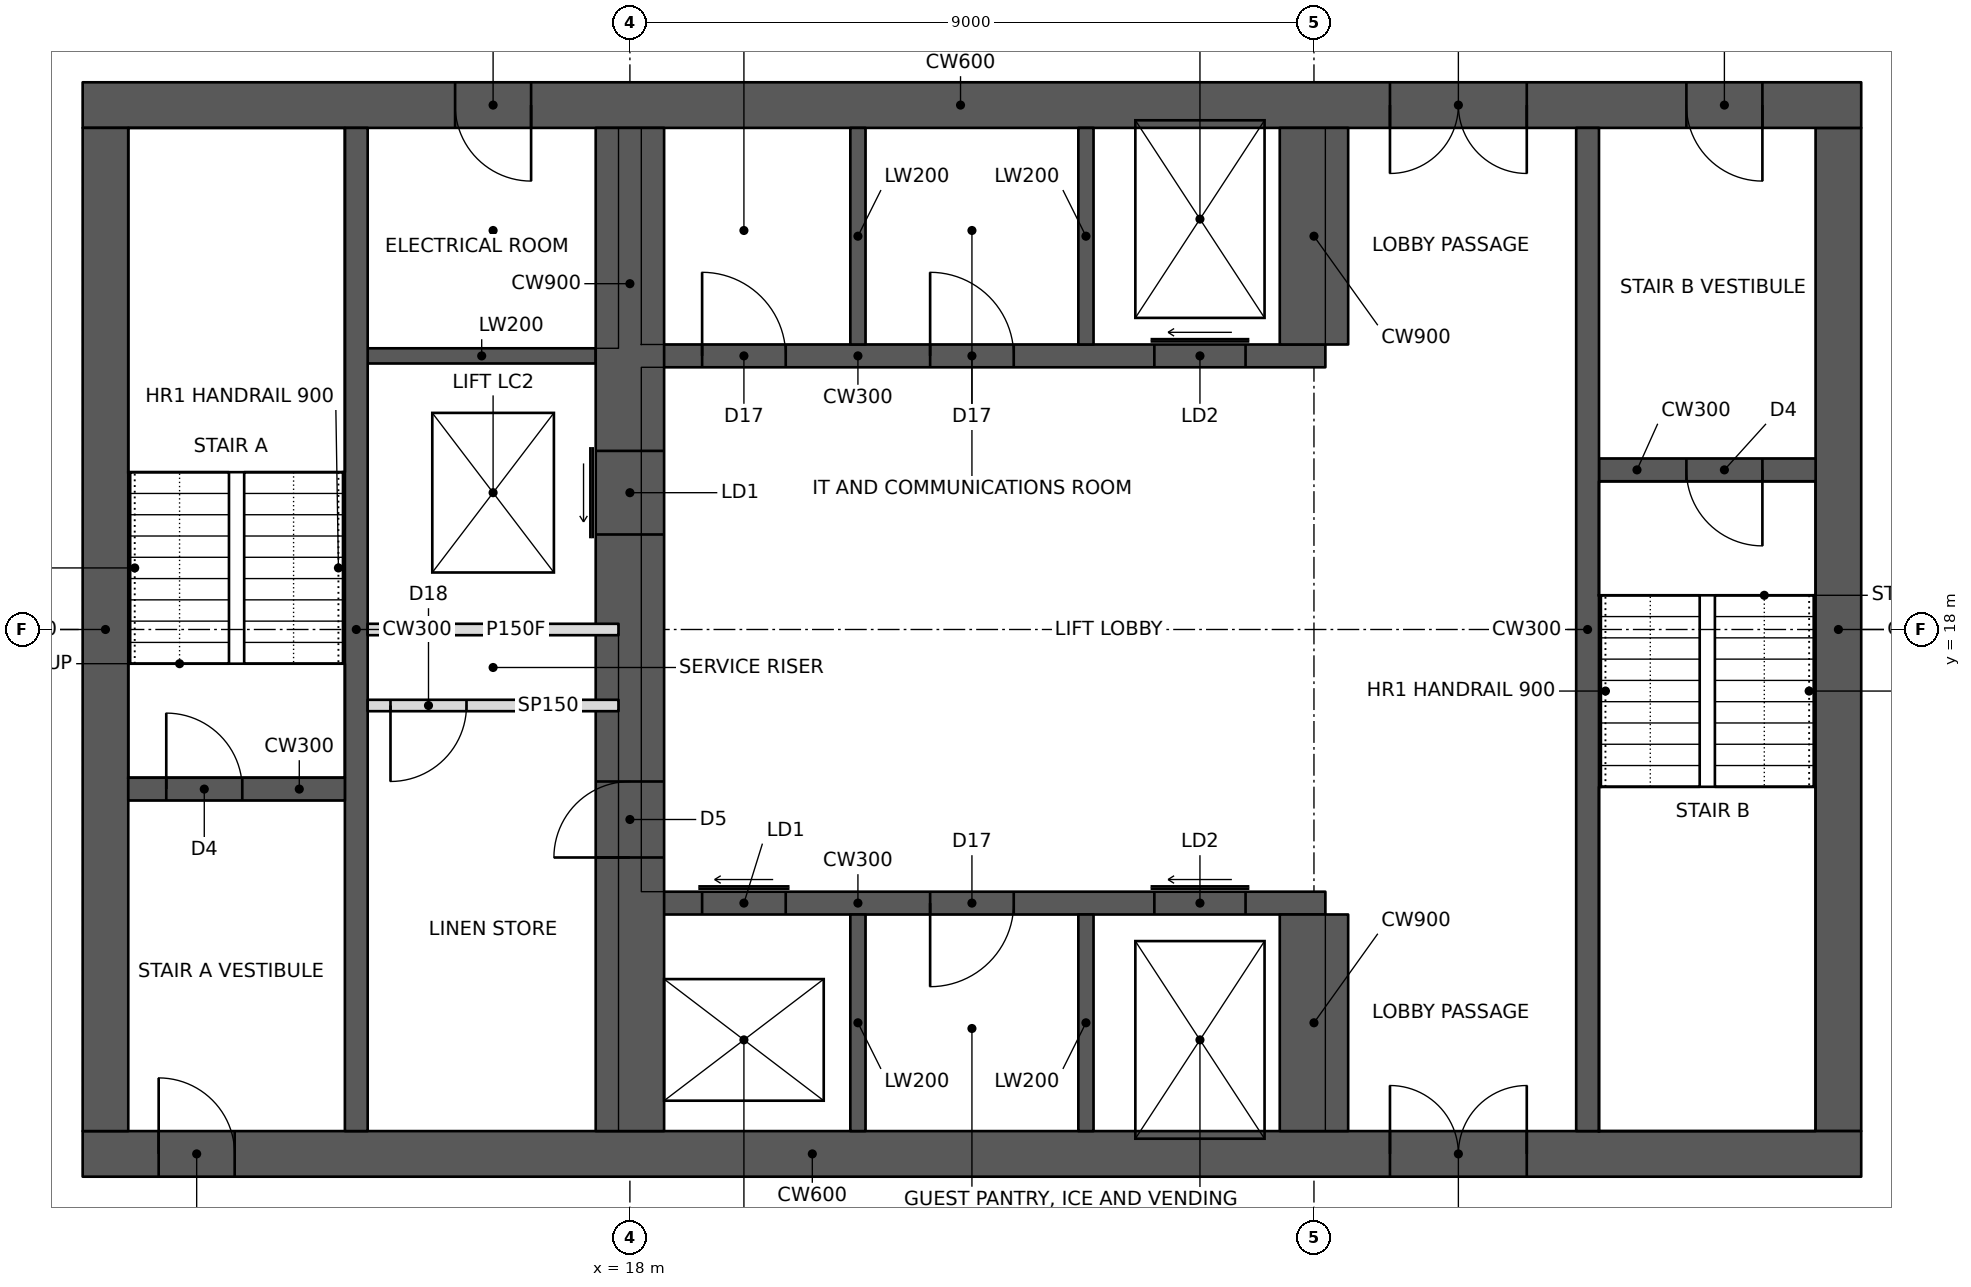
"""IFC4 building model, lengths in metres.
Left out: names, types, materials, properties, quantities, classifications, styles, units other than length and angle.
Written with IfcOpenShell. Run it as: python <this file> out.ifc"""

import sys

from ifc_helpers import new_model, si_unit, direction, frame, frame_2d, origin, place, context, subcontext, project, spatial, rectangle, extrude, element, fill, save


model = new_model("IFC4")
c1 = context("Model", 3, precision=1e-05, world=origin(), true_north=direction((0.0, 1.0)))
c2 = subcontext(c1, "Body", "Model", "MODEL_VIEW")
j1 = project(units=[si_unit("LENGTHUNIT", "METRE"), si_unit("PLANEANGLEUNIT", "RADIAN")], contexts=[c1])
p1 = place(None, origin())
s1 = spatial("IfcSite", under=j1, at=p1, CompositionType="ELEMENT")
p2 = place(p1, origin())
s2 = spatial("IfcBuilding", under=s1, at=p2, CompositionType="ELEMENT")
p3 = place(p2, frame((0.0, 0.0, 218.2)))
s3 = spatial("IfcBuildingStorey", under=s2, at=p3, CompositionType="ELEMENT", Elevation=218.2)
p4 = place(p3, frame((10.8, 11.1, 0.0), z_axis=(0.0, 0.0, 1.0), x_axis=(1.0, 0.0, 0.0)))
e1 = element("IfcWall", 1, at=p4, inside=s3, PredefinedType="SHEAR", context=c2, shape_type="SweptSolid", body=[
    extrude(rectangle(XDim=23.4, YDim=0.6, at=frame_2d((11.7, 0.0))), origin(), (0.0, 0.0, 1.0), 3.4),
])
p5 = place(p4, frame((1.0, 0.0, 0.0)))
e2 = element("IfcOpeningElement", 2, at=p5, cuts=e1, PredefinedType="OPENING", context=c2, shape_type="SweptSolid", body=[
    extrude(rectangle(XDim=1.0, YDim=2.1, at=frame_2d((0.5, 1.05))), frame((0.0, 0.31, 0.0), z_axis=(0.0, -1.0, 0.0), x_axis=(1.0, 0.0, 0.0)), (0.0, 0.0, 1.0), 0.62),
])
p6 = place(p4, frame((17.2, 0.0, 0.0)))
e3 = element("IfcOpeningElement", 3, at=p6, cuts=e1, PredefinedType="OPENING", context=c2, shape_type="SweptSolid", body=[
    extrude(rectangle(XDim=1.8, YDim=2.1, at=frame_2d((0.9, 1.05))), frame((0.0, 0.31, 0.0), z_axis=(0.0, -1.0, 0.0), x_axis=(1.0, 0.0, 0.0)), (0.0, 0.0, 1.0), 0.62),
])
p7 = place(p3, frame((10.8, 24.9, 0.0), z_axis=(0.0, 0.0, 1.0), x_axis=(1.0, 0.0, 0.0)))
e4 = element("IfcWall", 4, at=p7, inside=s3, PredefinedType="SHEAR", context=c2, shape_type="SweptSolid", body=[
    extrude(rectangle(XDim=23.4, YDim=0.6, at=frame_2d((11.7, 0.0))), origin(), (0.0, 0.0, 1.0), 3.4),
])
p8 = place(p7, frame((17.2, 0.0, 0.0)))
e5 = element("IfcOpeningElement", 5, at=p8, cuts=e4, PredefinedType="OPENING", context=c2, shape_type="SweptSolid", body=[
    extrude(rectangle(XDim=1.8, YDim=2.1, at=frame_2d((0.9, 1.05))), frame((0.0, 0.31, 0.0), z_axis=(0.0, -1.0, 0.0), x_axis=(1.0, 0.0, 0.0)), (0.0, 0.0, 1.0), 0.62),
])
p9 = place(p7, frame((21.1, 0.0, 0.0)))
e6 = element("IfcOpeningElement", 6, at=p9, cuts=e4, PredefinedType="OPENING", context=c2, shape_type="SweptSolid", body=[
    extrude(rectangle(XDim=1.0, YDim=2.1, at=frame_2d((0.5, 1.05))), frame((0.0, 0.31, 0.0), z_axis=(0.0, -1.0, 0.0), x_axis=(1.0, 0.0, 0.0)), (0.0, 0.0, 1.0), 0.62),
])
p10 = place(p7, frame((4.9, 0.0, 0.0)))
e7 = element("IfcOpeningElement", 7, at=p10, cuts=e4, PredefinedType="OPENING", context=c2, shape_type="SweptSolid", body=[
    extrude(rectangle(XDim=1.0, YDim=2.1, at=frame_2d((0.5, 1.05))), frame((0.0, 0.31, 0.0), z_axis=(0.0, -1.0, 0.0), x_axis=(1.0, 0.0, 0.0)), (0.0, 0.0, 1.0), 0.62),
])
for number, where, z_axis, x_axis in (
    (8, (11.1, 11.4, 0.0), (0.0, 0.0, 1.0), (0.0, 1.0, 0.0)),
    (9, (33.9, 11.4, 0.0), (0.0, 0.0, 1.0), (0.0, 1.0, 0.0)),
):
    element("IfcWall", number, at=place(p3, frame(where, z_axis=z_axis, x_axis=x_axis)), inside=s3, PredefinedType="SHEAR", context=c2, shape_type="SweptSolid", body=[
        extrude(rectangle(XDim=13.2, YDim=0.6, at=frame_2d((6.6, 0.0))), origin(), (0.0, 0.0, 1.0), 3.4),
    ])
p11 = place(p3, frame((14.4, 11.4, 0.0), z_axis=(0.0, 0.0, 1.0), x_axis=(0.0, 1.0, 0.0)))
e10 = element("IfcWall", 10, at=p11, inside=s3, PredefinedType="SHEAR", context=c2, shape_type="SweptSolid", body=[
    extrude(rectangle(XDim=13.2, YDim=0.3, at=frame_2d((6.6, 0.0))), origin(), (0.0, 0.0, 1.0), 3.4),
])
p12 = place(p3, frame((11.4, 15.9, 0.0), z_axis=(0.0, 0.0, 1.0), x_axis=(1.0, 0.0, 0.0)))
e11 = element("IfcWall", 11, at=p12, inside=s3, PredefinedType="SHEAR", context=c2, shape_type="SweptSolid", body=[
    extrude(rectangle(XDim=2.85, YDim=0.3, at=frame_2d((1.425, 0.0))), origin(), (0.0, 0.0, 1.0), 3.4),
])
p13 = place(p12, frame((0.5, 0.0, 0.0)))
e12 = element("IfcOpeningElement", 12, at=p13, cuts=e11, PredefinedType="OPENING", context=c2, shape_type="SweptSolid", body=[
    extrude(rectangle(XDim=1.0, YDim=2.1, at=frame_2d((0.5, 1.05))), frame((0.0, 0.16, 0.0), z_axis=(0.0, -1.0, 0.0), x_axis=(1.0, 0.0, 0.0)), (0.0, 0.0, 1.0), 0.32),
])
p14 = place(p3, frame((18.0, 11.4, 0.0), z_axis=(0.0, 0.0, 1.0), x_axis=(0.0, 1.0, 0.0)))
e13 = element("IfcWall", 13, at=p14, inside=s3, PredefinedType="SHEAR", context=c2, shape_type="SweptSolid", body=[
    extrude(rectangle(XDim=13.2, YDim=0.9, at=frame_2d((6.6, 0.0))), origin(), (0.0, 0.0, 1.0), 3.4),
])
p15 = place(p14, frame((3.6, 0.0, 0.0)))
e14 = element("IfcOpeningElement", 14, at=p15, cuts=e13, PredefinedType="OPENING", context=c2, shape_type="SweptSolid", body=[
    extrude(rectangle(XDim=1.0, YDim=2.1, at=frame_2d((0.5, 1.05))), frame((0.0, 0.46, 0.0), z_axis=(0.0, -1.0, 0.0), x_axis=(1.0, 0.0, 0.0)), (0.0, 0.0, 1.0), 0.92),
])
p16 = place(p14, frame((7.85, 0.0, 0.0)))
e15 = element("IfcOpeningElement", 15, at=p16, cuts=e13, PredefinedType="OPENING", context=c2, shape_type="SweptSolid", body=[
    extrude(rectangle(XDim=1.1, YDim=2.1, at=frame_2d((0.55, 1.05))), frame((0.0, 0.46, 0.0), z_axis=(0.0, -1.0, 0.0), x_axis=(1.0, 0.0, 0.0)), (0.0, 0.0, 1.0), 0.92),
])
p17 = place(p3, frame((14.55, 18.0, 0.0), z_axis=(0.0, 0.0, 1.0), x_axis=(1.0, 0.0, 0.0)))
e16 = element("IfcWall", 16, at=p17, inside=s3, PredefinedType="PARTITIONING", context=c2, shape_type="SweptSolid", body=[
    extrude(rectangle(XDim=3.3, YDim=0.15, at=frame_2d((1.65, 0.0))), origin(), (0.0, 0.0, 1.0), 3.15),
])
p18 = place(p3, frame((18.15, 14.4, 0.0), z_axis=(0.0, 0.0, 1.0), x_axis=(1.0, 0.0, 0.0)))
e17 = element("IfcWall", 17, at=p18, inside=s3, PredefinedType="SHEAR", context=c2, shape_type="SweptSolid", body=[
    extrude(rectangle(XDim=9.0, YDim=0.3, at=frame_2d((4.5, 0.0))), origin(), (0.0, 0.0, 1.0), 3.4),
])
p19 = place(p18, frame((0.8, 0.0, 0.0)))
e18 = element("IfcOpeningElement", 18, at=p19, cuts=e17, PredefinedType="OPENING", context=c2, shape_type="SweptSolid", body=[
    extrude(rectangle(XDim=1.1, YDim=2.1, at=frame_2d((0.55, 1.05))), frame((0.0, 0.16, 0.0), z_axis=(0.0, -1.0, 0.0), x_axis=(1.0, 0.0, 0.0)), (0.0, 0.0, 1.0), 0.32),
])
p20 = place(p18, frame((6.75, 0.0, 0.0)))
e19 = element("IfcOpeningElement", 19, at=p20, cuts=e17, PredefinedType="OPENING", context=c2, shape_type="SweptSolid", body=[
    extrude(rectangle(XDim=1.2, YDim=2.1, at=frame_2d((0.6, 1.05))), frame((0.0, 0.16, 0.0), z_axis=(0.0, -1.0, 0.0), x_axis=(1.0, 0.0, 0.0)), (0.0, 0.0, 1.0), 0.32),
])
p21 = place(p18, frame((3.8, 0.0, 0.0)))
e20 = element("IfcOpeningElement", 20, at=p21, cuts=e17, PredefinedType="OPENING", context=c2, shape_type="SweptSolid", body=[
    extrude(rectangle(XDim=1.1, YDim=2.1, at=frame_2d((0.55, 1.05))), frame((0.0, 0.16, 0.0), z_axis=(0.0, -1.0, 0.0), x_axis=(1.0, 0.0, 0.0)), (0.0, 0.0, 1.0), 0.32),
])
p22 = place(p3, frame((27.0, 11.4, 0.0), z_axis=(0.0, 0.0, 1.0), x_axis=(0.0, 1.0, 0.0)))
e21 = element("IfcWall", 21, at=p22, inside=s3, PredefinedType="SHEAR", context=c2, shape_type="SweptSolid", body=[
    extrude(rectangle(XDim=2.85, YDim=0.9, at=frame_2d((1.425, 0.0))), origin(), (0.0, 0.0, 1.0), 3.4),
])
for number, where, z_axis, x_axis in (
    (22, (21.0, 11.4, 0.0), (0.0, 0.0, 1.0), (0.0, 1.0, 0.0)),
    (23, (24.0, 11.4, 0.0), (0.0, 0.0, 1.0), (0.0, 1.0, 0.0)),
):
    element("IfcWall", number, at=place(p3, frame(where, z_axis=z_axis, x_axis=x_axis)), inside=s3, PredefinedType="SHEAR", context=c2, shape_type="SweptSolid", body=[
        extrude(rectangle(XDim=2.85, YDim=0.2, at=frame_2d((1.425, 0.0))), origin(), (0.0, 0.0, 1.0), 3.4),
    ])
p23 = place(p3, frame((18.15, 21.6, 0.0), z_axis=(0.0, 0.0, 1.0), x_axis=(1.0, 0.0, 0.0)))
e24 = element("IfcWall", 24, at=p23, inside=s3, PredefinedType="SHEAR", context=c2, shape_type="SweptSolid", body=[
    extrude(rectangle(XDim=9.0, YDim=0.3, at=frame_2d((4.5, 0.0))), origin(), (0.0, 0.0, 1.0), 3.4),
])
p24 = place(p23, frame((6.75, 0.0, 0.0)))
e25 = element("IfcOpeningElement", 25, at=p24, cuts=e24, PredefinedType="OPENING", context=c2, shape_type="SweptSolid", body=[
    extrude(rectangle(XDim=1.2, YDim=2.1, at=frame_2d((0.6, 1.05))), frame((0.0, 0.16, 0.0), z_axis=(0.0, -1.0, 0.0), x_axis=(1.0, 0.0, 0.0)), (0.0, 0.0, 1.0), 0.32),
])
p25 = place(p23, frame((0.8, 0.0, 0.0)))
e26 = element("IfcOpeningElement", 26, at=p25, cuts=e24, PredefinedType="OPENING", context=c2, shape_type="SweptSolid", body=[
    extrude(rectangle(XDim=1.1, YDim=2.1, at=frame_2d((0.55, 1.05))), frame((0.0, 0.16, 0.0), z_axis=(0.0, -1.0, 0.0), x_axis=(1.0, 0.0, 0.0)), (0.0, 0.0, 1.0), 0.32),
])
p26 = place(p23, frame((3.8, 0.0, 0.0)))
e27 = element("IfcOpeningElement", 27, at=p26, cuts=e24, PredefinedType="OPENING", context=c2, shape_type="SweptSolid", body=[
    extrude(rectangle(XDim=1.1, YDim=2.1, at=frame_2d((0.55, 1.05))), frame((0.0, 0.16, 0.0), z_axis=(0.0, -1.0, 0.0), x_axis=(1.0, 0.0, 0.0)), (0.0, 0.0, 1.0), 0.32),
])
p27 = place(p3, frame((27.0, 21.75, 0.0), z_axis=(0.0, 0.0, 1.0), x_axis=(0.0, 1.0, 0.0)))
e28 = element("IfcWall", 28, at=p27, inside=s3, PredefinedType="SHEAR", context=c2, shape_type="SweptSolid", body=[
    extrude(rectangle(XDim=2.85, YDim=0.9, at=frame_2d((1.425, 0.0))), origin(), (0.0, 0.0, 1.0), 3.4),
])
for number, where, z_axis, x_axis in (
    (29, (21.0, 21.75, 0.0), (0.0, 0.0, 1.0), (0.0, 1.0, 0.0)),
    (30, (24.0, 21.75, 0.0), (0.0, 0.0, 1.0), (0.0, 1.0, 0.0)),
):
    element("IfcWall", number, at=place(p3, frame(where, z_axis=z_axis, x_axis=x_axis)), inside=s3, PredefinedType="SHEAR", context=c2, shape_type="SweptSolid", body=[
        extrude(rectangle(XDim=2.85, YDim=0.2, at=frame_2d((1.425, 0.0))), origin(), (0.0, 0.0, 1.0), 3.4),
    ])
p28 = place(p3, frame((30.6, 11.4, 0.0), z_axis=(0.0, 0.0, 1.0), x_axis=(0.0, 1.0, 0.0)))
e31 = element("IfcWall", 31, at=p28, inside=s3, PredefinedType="SHEAR", context=c2, shape_type="SweptSolid", body=[
    extrude(rectangle(XDim=13.2, YDim=0.3, at=frame_2d((6.6, 0.0))), origin(), (0.0, 0.0, 1.0), 3.4),
])
p29 = place(p3, frame((30.75, 20.1, 0.0), z_axis=(0.0, 0.0, 1.0), x_axis=(1.0, 0.0, 0.0)))
e32 = element("IfcWall", 32, at=p29, inside=s3, PredefinedType="SHEAR", context=c2, shape_type="SweptSolid", body=[
    extrude(rectangle(XDim=2.85, YDim=0.3, at=frame_2d((1.425, 0.0))), origin(), (0.0, 0.0, 1.0), 3.4),
])
p30 = place(p29, frame((1.15, 0.0, 0.0)))
e33 = element("IfcOpeningElement", 33, at=p30, cuts=e32, PredefinedType="OPENING", context=c2, shape_type="SweptSolid", body=[
    extrude(rectangle(XDim=1.0, YDim=2.1, at=frame_2d((0.5, 1.05))), frame((0.0, 0.16, 0.0), z_axis=(0.0, -1.0, 0.0), x_axis=(1.0, 0.0, 0.0)), (0.0, 0.0, 1.0), 0.32),
])
p31 = place(p3, frame((14.55, 21.6, 0.0), z_axis=(0.0, 0.0, 1.0), x_axis=(1.0, 0.0, 0.0)))
e34 = element("IfcWall", 34, at=p31, inside=s3, PredefinedType="SHEAR", context=c2, shape_type="SweptSolid", body=[
    extrude(rectangle(XDim=3.0, YDim=0.2, at=frame_2d((1.5, 0.0))), origin(), (0.0, 0.0, 1.0), 3.4),
])
p32 = place(p3, frame((14.55, 17.0, 0.0), z_axis=(0.0, 0.0, 1.0), x_axis=(1.0, 0.0, 0.0)))
e35 = element("IfcWall", 35, at=p32, inside=s3, PredefinedType="PARTITIONING", context=c2, shape_type="SweptSolid", body=[
    extrude(rectangle(XDim=3.3, YDim=0.15, at=frame_2d((1.65, 0.0))), origin(), (0.0, 0.0, 1.0), 3.15),
])
p33 = place(p32, frame((0.3, 0.0, 0.0)))
e36 = element("IfcOpeningElement", 36, at=p33, cuts=e35, PredefinedType="OPENING", context=c2, shape_type="SweptSolid", body=[
    extrude(rectangle(XDim=1.0, YDim=2.1, at=frame_2d((0.5, 1.05))), frame((0.0, 0.085, 0.0), z_axis=(0.0, -1.0, 0.0), x_axis=(1.0, 0.0, 0.0)), (0.0, 0.0, 1.0), 0.17),
])
p34 = place(p33, frame((1.0, 0.0, 0.0), z_axis=(0.0, 0.0, 1.0), x_axis=(-1.0, 0.0, 0.0)))
e37 = element("IfcDoor", 37, at=p34, inside=s3, OperationType="SINGLE_SWING_RIGHT", PredefinedType="DOOR", context=c2, shape_type="SweptSolid", body=[
    extrude(rectangle(XDim=1.0, YDim=2.1, at=frame_2d((0.5, 1.05))), frame((0.0, 0.025, 0.0), z_axis=(0.0, -1.0, 0.0), x_axis=(1.0, 0.0, 0.0)), (0.0, 0.0, 1.0), 0.05),
])
fill(e36, e37)
p35 = place(p5, origin())
e38 = element("IfcDoor", 38, at=p35, inside=s3, OperationType="SINGLE_SWING_LEFT", PredefinedType="DOOR", context=c2, shape_type="SweptSolid", body=[
    extrude(rectangle(XDim=1.0, YDim=2.1, at=frame_2d((0.5, 1.05))), frame((0.0, 0.025, 0.0), z_axis=(0.0, -1.0, 0.0), x_axis=(1.0, 0.0, 0.0)), (0.0, 0.0, 1.0), 0.05),
])
fill(e2, e38)
p36 = place(p13, origin())
e39 = element("IfcDoor", 39, at=p36, inside=s3, OperationType="SINGLE_SWING_LEFT", PredefinedType="DOOR", context=c2, shape_type="SweptSolid", body=[
    extrude(rectangle(XDim=1.0, YDim=2.1, at=frame_2d((0.5, 1.05))), frame((0.0, 0.025, 0.0), z_axis=(0.0, -1.0, 0.0), x_axis=(1.0, 0.0, 0.0)), (0.0, 0.0, 1.0), 0.05),
])
fill(e12, e39)
p37 = place(p6, origin())
e40 = element("IfcDoor", 40, at=p37, inside=s3, OperationType="DOUBLE_DOOR_SINGLE_SWING", PredefinedType="DOOR", context=c2, shape_type="SweptSolid", body=[
    extrude(rectangle(XDim=1.8, YDim=2.1, at=frame_2d((0.9, 1.05))), frame((0.0, 0.025, 0.0), z_axis=(0.0, -1.0, 0.0), x_axis=(1.0, 0.0, 0.0)), (0.0, 0.0, 1.0), 0.05),
])
fill(e3, e40)
p38 = place(p8, frame((1.8, 0.0, 0.0), z_axis=(0.0, 0.0, 1.0), x_axis=(-1.0, 0.0, 0.0)))
e41 = element("IfcDoor", 41, at=p38, inside=s3, OperationType="DOUBLE_DOOR_SINGLE_SWING", PredefinedType="DOOR", context=c2, shape_type="SweptSolid", body=[
    extrude(rectangle(XDim=1.8, YDim=2.1, at=frame_2d((0.9, 1.05))), frame((0.0, 0.025, 0.0), z_axis=(0.0, -1.0, 0.0), x_axis=(1.0, 0.0, 0.0)), (0.0, 0.0, 1.0), 0.05),
])
fill(e5, e41)
p39 = place(p9, frame((1.0, 0.0, 0.0), z_axis=(0.0, 0.0, 1.0), x_axis=(-1.0, 0.0, 0.0)))
e42 = element("IfcDoor", 42, at=p39, inside=s3, OperationType="SINGLE_SWING_LEFT", PredefinedType="DOOR", context=c2, shape_type="SweptSolid", body=[
    extrude(rectangle(XDim=1.0, YDim=2.1, at=frame_2d((0.5, 1.05))), frame((0.0, 0.025, 0.0), z_axis=(0.0, -1.0, 0.0), x_axis=(1.0, 0.0, 0.0)), (0.0, 0.0, 1.0), 0.05),
])
fill(e6, e42)
p40 = place(p30, frame((1.0, 0.0, 0.0), z_axis=(0.0, 0.0, 1.0), x_axis=(-1.0, 0.0, 0.0)))
e43 = element("IfcDoor", 43, at=p40, inside=s3, OperationType="SINGLE_SWING_LEFT", PredefinedType="DOOR", context=c2, shape_type="SweptSolid", body=[
    extrude(rectangle(XDim=1.0, YDim=2.1, at=frame_2d((0.5, 1.05))), frame((0.0, 0.025, 0.0), z_axis=(0.0, -1.0, 0.0), x_axis=(1.0, 0.0, 0.0)), (0.0, 0.0, 1.0), 0.05),
])
fill(e33, e43)
p41 = place(p15, origin())
e44 = element("IfcDoor", 44, at=p41, inside=s3, OperationType="SINGLE_SWING_LEFT", PredefinedType="DOOR", context=c2, shape_type="SweptSolid", body=[
    extrude(rectangle(XDim=1.0, YDim=2.1, at=frame_2d((0.5, 1.05))), frame((0.0, 0.025, 0.0), z_axis=(0.0, -1.0, 0.0), x_axis=(1.0, 0.0, 0.0)), (0.0, 0.0, 1.0), 0.05),
])
fill(e14, e44)
p42 = place(p10, frame((1.0, 0.0, 0.0), z_axis=(0.0, 0.0, 1.0), x_axis=(-1.0, 0.0, 0.0)))
e45 = element("IfcDoor", 45, at=p42, inside=s3, OperationType="SINGLE_SWING_LEFT", PredefinedType="DOOR", context=c2, shape_type="SweptSolid", body=[
    extrude(rectangle(XDim=1.0, YDim=2.1, at=frame_2d((0.5, 1.05))), frame((0.0, 0.025, 0.0), z_axis=(0.0, -1.0, 0.0), x_axis=(1.0, 0.0, 0.0)), (0.0, 0.0, 1.0), 0.05),
])
fill(e7, e45)
p43 = place(p19, origin())
e46 = element("IfcDoor", 46, at=p43, inside=s3, OperationType="SLIDING_TO_LEFT", PredefinedType="DOOR", context=c2, shape_type="SweptSolid", body=[
    extrude(rectangle(XDim=1.1, YDim=2.1, at=frame_2d((0.55, 1.05))), frame((0.0, 0.025, 0.0), z_axis=(0.0, -1.0, 0.0), x_axis=(1.0, 0.0, 0.0)), (0.0, 0.0, 1.0), 0.05),
])
fill(e18, e46)
p44 = place(p16, origin())
e47 = element("IfcDoor", 47, at=p44, inside=s3, OperationType="SLIDING_TO_LEFT", PredefinedType="DOOR", context=c2, shape_type="SweptSolid", body=[
    extrude(rectangle(XDim=1.1, YDim=2.1, at=frame_2d((0.55, 1.05))), frame((0.0, 0.025, 0.0), z_axis=(0.0, -1.0, 0.0), x_axis=(1.0, 0.0, 0.0)), (0.0, 0.0, 1.0), 0.05),
])
fill(e15, e47)
p45 = place(p20, origin())
e48 = element("IfcDoor", 48, at=p45, inside=s3, OperationType="SLIDING_TO_LEFT", PredefinedType="DOOR", context=c2, shape_type="SweptSolid", body=[
    extrude(rectangle(XDim=1.2, YDim=2.1, at=frame_2d((0.6, 1.05))), frame((0.0, 0.025, 0.0), z_axis=(0.0, -1.0, 0.0), x_axis=(1.0, 0.0, 0.0)), (0.0, 0.0, 1.0), 0.05),
])
fill(e19, e48)
p46 = place(p24, origin())
e49 = element("IfcDoor", 49, at=p46, inside=s3, OperationType="SLIDING_TO_LEFT", PredefinedType="DOOR", context=c2, shape_type="SweptSolid", body=[
    extrude(rectangle(XDim=1.2, YDim=2.1, at=frame_2d((0.6, 1.05))), frame((0.0, 0.025, 0.0), z_axis=(0.0, -1.0, 0.0), x_axis=(1.0, 0.0, 0.0)), (0.0, 0.0, 1.0), 0.05),
])
fill(e25, e49)
p47 = place(p25, origin())
e50 = element("IfcDoor", 50, at=p47, inside=s3, OperationType="SINGLE_SWING_LEFT", PredefinedType="DOOR", context=c2, shape_type="SweptSolid", body=[
    extrude(rectangle(XDim=1.1, YDim=2.1, at=frame_2d((0.55, 1.05))), frame((0.0, 0.025, 0.0), z_axis=(0.0, -1.0, 0.0), x_axis=(1.0, 0.0, 0.0)), (0.0, 0.0, 1.0), 0.05),
])
fill(e26, e50)
p48 = place(p26, origin())
e51 = element("IfcDoor", 51, at=p48, inside=s3, OperationType="SINGLE_SWING_LEFT", PredefinedType="DOOR", context=c2, shape_type="SweptSolid", body=[
    extrude(rectangle(XDim=1.1, YDim=2.1, at=frame_2d((0.55, 1.05))), frame((0.0, 0.025, 0.0), z_axis=(0.0, -1.0, 0.0), x_axis=(1.0, 0.0, 0.0)), (0.0, 0.0, 1.0), 0.05),
])
fill(e27, e51)
p49 = place(p21, frame((1.1, 0.0, 0.0), z_axis=(0.0, 0.0, 1.0), x_axis=(-1.0, 0.0, 0.0)))
e52 = element("IfcDoor", 52, at=p49, inside=s3, OperationType="SINGLE_SWING_RIGHT", PredefinedType="DOOR", context=c2, shape_type="SweptSolid", body=[
    extrude(rectangle(XDim=1.1, YDim=2.1, at=frame_2d((0.55, 1.05))), frame((0.0, 0.025, 0.0), z_axis=(0.0, -1.0, 0.0), x_axis=(1.0, 0.0, 0.0)), (0.0, 0.0, 1.0), 0.05),
])
fill(e20, e52)
save(model, sys.argv[1])
